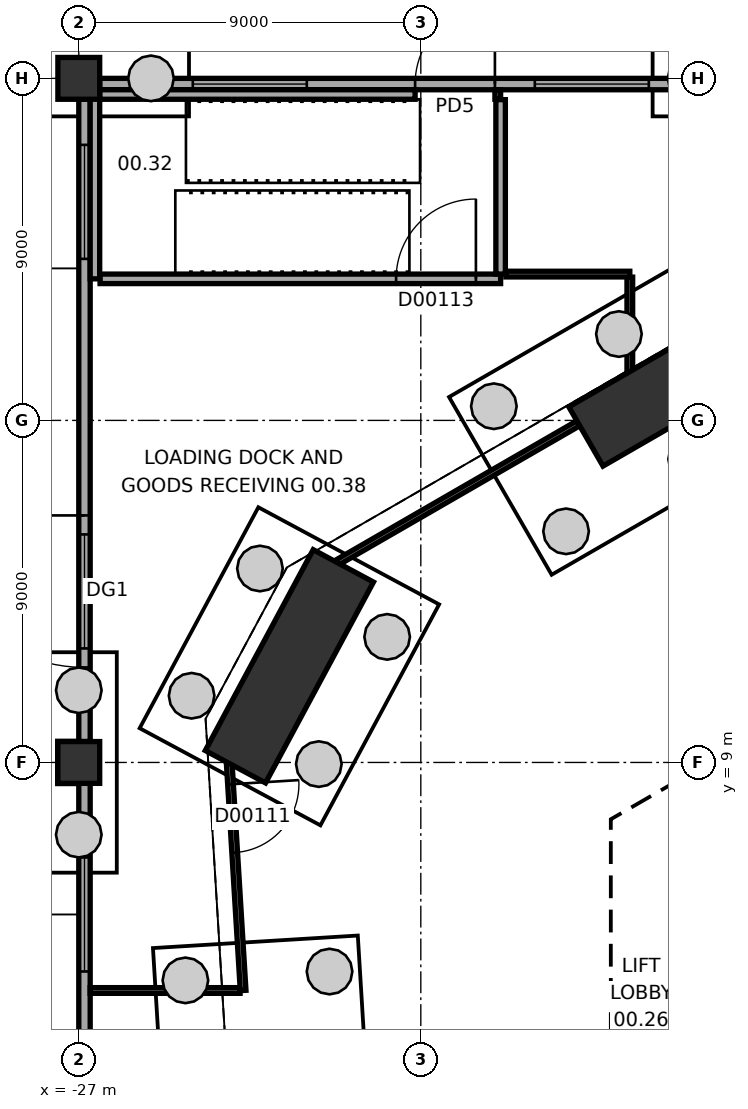
"""IFC4 building model, lengths in metres.
Left out: names, types, materials, properties, quantities, classifications, styles, units other than length and angle.
Written with IfcOpenShell. Run it as: python <this file> out.ifc"""

import sys

from ifc_helpers import new_model, si_unit, direction, frame, frame_2d, origin, origin_2d, place, context, subcontext, project, spatial, rectangle, extrude, element, fill, save


model = new_model("IFC4")
c1 = context("Model", 3, precision=1e-05, world=origin(), true_north=direction((0.0, 1.0)))
c2 = subcontext(c1, "Body", "Model", "MODEL_VIEW")
j1 = project(units=[si_unit("LENGTHUNIT", "METRE"), si_unit("PLANEANGLEUNIT", "RADIAN")], contexts=[c1])
p1 = place(None, origin())
s1 = spatial("IfcSite", under=j1, at=p1, CompositionType="ELEMENT")
p2 = place(p1, origin())
s2 = spatial("IfcBuilding", under=s1, at=p2, CompositionType="ELEMENT")
p3 = place(p2, origin())
s3 = spatial("IfcBuildingStorey", under=s2, at=p3, CompositionType="ELEMENT", Elevation=0.0)
p4 = place(p3, frame((-11.837, 18.627, -0.3), z_axis=(0.0, 0.0, 1.0), x_axis=(-0.866028021766, -0.499995465495, 0.0)))
e1 = element("IfcColumn", 1, at=p4, inside=s3, PredefinedType="COLUMN", context=c2, shape_type="SweptSolid", body=[
    extrude(rectangle(XDim=4.2, YDim=1.8, at=origin_2d()), origin(), (0.0, 0.0, 1.0), 7.8),
])
p5 = place(p3, frame((-21.458, 11.53, -0.3), z_axis=(0.0, 0.0, 1.0), x_axis=(-0.473316592293, -0.880892390397, 0.0)))
e2 = element("IfcColumn", 2, at=p5, inside=s3, PredefinedType="COLUMN", context=c2, shape_type="SweptSolid", body=[
    extrude(rectangle(XDim=6.0, YDim=1.8, at=origin_2d()), origin(), (0.0, 0.0, 1.0), 7.8),
])
for number, where, z_axis, x_axis in (
    (3, (-27.0, 9.0, -0.3), (0.0, 0.0, 1.0), (1.0, 0.0, 0.0)),
    (4, (-27.0, 27.0, -0.3), (0.0, 0.0, 1.0), (1.0, 0.0, 0.0)),
):
    element("IfcColumn", number, at=place(p3, frame(where, z_axis=z_axis, x_axis=x_axis)), inside=s3, PredefinedType="COLUMN", context=c2, shape_type="SweptSolid", body=[
        extrude(rectangle(XDim=1.1, YDim=1.1, at=origin_2d()), origin(), (0.0, 0.0, 1.0), 7.8),
    ])
p6 = place(p3, frame((-9.55, 26.85, 0.0), z_axis=(0.0, 0.0, 1.0), x_axis=(-1.0, 0.0, 0.0)))
e5 = element("IfcWall", 5, at=p6, inside=s3, PredefinedType="STANDARD", context=c2, shape_type="SweptSolid", body=[
    extrude(rectangle(XDim=16.9, YDim=0.3, at=frame_2d((8.45, 0.0))), origin(), (0.0, 0.0, 1.0), 6.0),
])
p7 = place(p6, frame((2.45, 0.0, 4.7)))
e6 = element("IfcOpeningElement", 6, at=p7, cuts=e5, PredefinedType="OPENING", context=c2, shape_type="SweptSolid", body=[
    extrude(rectangle(XDim=3.0, YDim=1.3, at=frame_2d((1.5, 0.65))), frame((0.0, 0.16, 0.0), z_axis=(0.0, -1.0, 0.0), x_axis=(1.0, 0.0, 0.0)), (0.0, 0.0, 1.0), 0.32),
])
p8 = place(p6, frame((11.45, 0.0, 4.7)))
e7 = element("IfcOpeningElement", 7, at=p8, cuts=e5, PredefinedType="OPENING", context=c2, shape_type="SweptSolid", body=[
    extrude(rectangle(XDim=3.0, YDim=1.3, at=frame_2d((1.5, 0.65))), frame((0.0, 0.16, 0.0), z_axis=(0.0, -1.0, 0.0), x_axis=(1.0, 0.0, 0.0)), (0.0, 0.0, 1.0), 0.32),
])
p9 = place(p6, frame((6.5, 0.0, 0.0)))
e8 = element("IfcOpeningElement", 8, at=p9, cuts=e5, PredefinedType="OPENING", context=c2, shape_type="SweptSolid", body=[
    extrude(rectangle(XDim=2.1, YDim=2.4, at=frame_2d((1.05, 1.2))), frame((0.0, 0.16, 0.0), z_axis=(0.0, -1.0, 0.0), x_axis=(1.0, 0.0, 0.0)), (0.0, 0.0, 1.0), 0.32),
])
p10 = place(p3, frame((-26.85, 26.45, 0.0), z_axis=(0.0, 0.0, 1.0), x_axis=(0.0, -1.0, 0.0)))
e9 = element("IfcWall", 9, at=p10, inside=s3, PredefinedType="STANDARD", context=c2, shape_type="SweptSolid", body=[
    extrude(rectangle(XDim=16.9, YDim=0.3, at=frame_2d((8.45, 0.0))), origin(), (0.0, 0.0, 1.0), 6.0),
])
p11 = place(p10, frame((1.2, 0.0, 4.7)))
e10 = element("IfcOpeningElement", 10, at=p11, cuts=e9, PredefinedType="OPENING", context=c2, shape_type="SweptSolid", body=[
    extrude(rectangle(XDim=3.0, YDim=1.3, at=frame_2d((1.5, 0.65))), frame((0.0, 0.16, 0.0), z_axis=(0.0, -1.0, 0.0), x_axis=(1.0, 0.0, 0.0)), (0.0, 0.0, 1.0), 0.32),
])
p12 = place(p10, frame((11.45, 0.0, 4.7)))
e11 = element("IfcOpeningElement", 11, at=p12, cuts=e9, PredefinedType="OPENING", context=c2, shape_type="SweptSolid", body=[
    extrude(rectangle(XDim=3.0, YDim=1.3, at=frame_2d((1.5, 0.65))), frame((0.0, 0.16, 0.0), z_axis=(0.0, -1.0, 0.0), x_axis=(1.0, 0.0, 0.0)), (0.0, 0.0, 1.0), 0.32),
])
p13 = place(p10, frame((10.95, 0.0, 0.0)))
e12 = element("IfcOpeningElement", 12, at=p13, cuts=e9, PredefinedType="OPENING", context=c2, shape_type="SweptSolid", body=[
    extrude(rectangle(XDim=4.0, YDim=4.5, at=frame_2d((2.0, 2.25))), frame((0.0, 0.16, 0.0), z_axis=(0.0, -1.0, 0.0), x_axis=(1.0, 0.0, 0.0)), (0.0, 0.0, 1.0), 0.32),
])
p14 = place(p3, frame((-26.85, 8.45, 0.0), z_axis=(0.0, 0.0, 1.0), x_axis=(0.0, -1.0, 0.0)))
e13 = element("IfcWall", 13, at=p14, inside=s3, PredefinedType="STANDARD", context=c2, shape_type="SweptSolid", body=[
    extrude(rectangle(XDim=16.9, YDim=0.3, at=frame_2d((8.45, 0.0))), origin(), (0.0, 0.0, 1.0), 6.0),
])
p15 = place(p14, frame((1.95, 0.0, 4.7)))
e14 = element("IfcOpeningElement", 14, at=p15, cuts=e13, PredefinedType="OPENING", context=c2, shape_type="SweptSolid", body=[
    extrude(rectangle(XDim=3.0, YDim=1.3, at=frame_2d((1.5, 0.65))), frame((0.0, 0.16, 0.0), z_axis=(0.0, -1.0, 0.0), x_axis=(1.0, 0.0, 0.0)), (0.0, 0.0, 1.0), 0.32),
])
p16 = place(p14, frame((11.95, 0.0, 4.7)))
e15 = element("IfcOpeningElement", 15, at=p16, cuts=e13, PredefinedType="OPENING", context=c2, shape_type="SweptSolid", body=[
    extrude(rectangle(XDim=3.0, YDim=1.3, at=frame_2d((1.5, 0.65))), frame((0.0, 0.16, 0.0), z_axis=(0.0, -1.0, 0.0), x_axis=(1.0, 0.0, 0.0)), (0.0, 0.0, 1.0), 0.32),
])
p17 = place(p14, frame((7.8, 0.0, 0.0)))
e16 = element("IfcOpeningElement", 16, at=p17, cuts=e13, PredefinedType="OPENING", context=c2, shape_type="SweptSolid", body=[
    extrude(rectangle(XDim=1.3, YDim=2.4, at=frame_2d((0.65, 1.2))), frame((0.0, 0.16, 0.0), z_axis=(0.0, -1.0, 0.0), x_axis=(1.0, 0.0, 0.0)), (0.0, 0.0, 1.0), 0.32),
])
p18 = place(p3, frame((-22.756, 3.0, 0.0), z_axis=(0.0, 0.0, 1.0), x_axis=(-1.0, 0.0, 0.0)))
e17 = element("IfcWall", 17, at=p18, inside=s3, PredefinedType="PARTITIONING", context=c2, shape_type="SweptSolid", body=[
    extrude(rectangle(XDim=3.944, YDim=0.15, at=frame_2d((1.972, 0.0))), origin(), (0.0, 0.0, 1.0), 7.2),
])
p19 = place(p3, frame((-23.041, 8.975, 0.0), z_axis=(0.0, 0.0, 1.0), x_axis=(0.061057818877, -0.99813423083, 0.0)))
e18 = element("IfcWall", 18, at=p19, inside=s3, PredefinedType="PARTITIONING", context=c2, shape_type="SweptSolid", body=[
    extrude(rectangle(XDim=5.986, YDim=0.15, at=frame_2d((2.993, 0.0))), origin(), (0.0, 0.0, 1.0), 5.7),
])
p20 = place(p19, frame((0.55, 0.0, 0.0)))
e19 = element("IfcOpeningElement", 19, at=p20, cuts=e18, PredefinedType="OPENING", context=c2, shape_type="SweptSolid", body=[
    extrude(rectangle(XDim=1.8, YDim=2.4, at=frame_2d((0.9, 1.2))), frame((0.0, 0.085, 0.0), z_axis=(0.0, -1.0, 0.0), x_axis=(1.0, 0.0, 0.0)), (0.0, 0.0, 1.0), 0.17),
])
p21 = place(p3, frame((-13.855, 17.924, 0.0), z_axis=(0.0, 0.0, 1.0), x_axis=(-0.866032447223, -0.499987800209, 0.0)))
e20 = element("IfcWall", 20, at=p21, inside=s3, PredefinedType="PARTITIONING", context=c2, shape_type="SweptSolid", body=[
    extrude(rectangle(XDim=7.327, YDim=0.15, at=frame_2d((3.664, 0.0))), origin(), (0.0, 0.0, 1.0), 5.7),
])
p22 = place(p3, frame((-15.9, 21.725, 0.0), z_axis=(0.0, 0.0, 1.0), x_axis=(-1.0, 0.0, 0.0)))
e21 = element("IfcWall", 21, at=p22, inside=s3, PredefinedType="SOLIDWALL", context=c2, shape_type="SweptSolid", body=[
    extrude(rectangle(XDim=10.54, YDim=0.25, at=frame_2d((5.27, 0.0))), origin(), (0.0, 0.0, 1.0), 7.2),
])
p23 = place(p22, frame((0.65, 0.0, 0.0)))
e22 = element("IfcOpeningElement", 22, at=p23, cuts=e21, PredefinedType="OPENING", context=c2, shape_type="SweptSolid", body=[
    extrude(rectangle(XDim=2.1, YDim=2.4, at=frame_2d((1.05, 1.2))), frame((0.0, 0.135, 0.0), z_axis=(0.0, -1.0, 0.0), x_axis=(1.0, 0.0, 0.0)), (0.0, 0.0, 1.0), 0.27),
])
p24 = place(p3, frame((-12.5, 21.77, 0.0), z_axis=(0.0, 0.0, 1.0), x_axis=(0.0, -1.0, 0.0)))
e23 = element("IfcWall", 23, at=p24, inside=s3, PredefinedType="PARTITIONING", context=c2, shape_type="SweptSolid", body=[
    extrude(rectangle(XDim=2.487, YDim=0.15, at=frame_2d((1.243, 0.0))), origin(), (0.0, 0.0, 1.0), 7.2),
])
p25 = place(p3, frame((-15.76, 21.85, 0.0), z_axis=(0.0, 0.0, 1.0), x_axis=(1.0, 0.0, 0.0)))
e24 = element("IfcWall", 24, at=p25, inside=s3, PredefinedType="PARTITIONING", context=c2, shape_type="SweptSolid", body=[
    extrude(rectangle(XDim=3.26, YDim=0.15, at=frame_2d((1.63, 0.0))), origin(), (0.0, 0.0, 1.0), 7.2),
])
p26 = place(p3, frame((-15.9, 26.44, 0.0), z_axis=(0.0, 0.0, 1.0), x_axis=(0.0, -1.0, 0.0)))
e25 = element("IfcWall", 25, at=p26, inside=s3, PredefinedType="SOLIDWALL", context=c2, shape_type="SweptSolid", body=[
    extrude(rectangle(XDim=4.59, YDim=0.25, at=frame_2d((2.295, 0.0))), origin(), (0.0, 0.0, 1.0), 7.2),
])
p27 = place(p3, frame((-26.575, 21.725, 0.0), z_axis=(0.0, 0.0, 1.0), x_axis=(0.0, 1.0, 0.0)))
e26 = element("IfcWall", 26, at=p27, inside=s3, PredefinedType="SOLIDWALL", context=c2, shape_type="SweptSolid", body=[
    extrude(rectangle(XDim=4.975, YDim=0.25, at=frame_2d((2.487, 0.0))), origin(), (0.0, 0.0, 1.0), 7.2),
])
p28 = place(p3, frame((-26.45, 26.575, 0.0), z_axis=(0.0, 0.0, 1.0), x_axis=(1.0, 0.0, 0.0)))
e27 = element("IfcWall", 27, at=p28, inside=s3, PredefinedType="SOLIDWALL", context=c2, shape_type="SweptSolid", body=[
    extrude(rectangle(XDim=8.3, YDim=0.25, at=frame_2d((4.15, 0.0))), origin(), (0.0, 0.0, 1.0), 7.2),
])
p29 = place(p3, frame((-16.05, 26.575, 0.0), z_axis=(0.0, 0.0, 1.0), x_axis=(1.0, 0.0, 0.0)))
e28 = element("IfcWall", 28, at=p29, inside=s3, PredefinedType="SOLIDWALL", context=c2, shape_type="SweptSolid", body=[
    extrude(rectangle(XDim=0.15, YDim=0.25, at=frame_2d((0.075, 0.0))), origin(), (0.0, 0.0, 1.0), 7.2),
])
p30 = place(p7, origin())
e29 = element("IfcWindow", 29, at=p30, inside=s3, PartitioningType="SINGLE_PANEL", PredefinedType="WINDOW", context=c2, shape_type="SweptSolid", body=[
    extrude(rectangle(XDim=3.0, YDim=1.3, at=frame_2d((1.5, 0.65))), frame((0.0, 0.03, 0.0), z_axis=(0.0, -1.0, 0.0), x_axis=(1.0, 0.0, 0.0)), (0.0, 0.0, 1.0), 0.06),
])
fill(e6, e29)
p31 = place(p8, origin())
e30 = element("IfcWindow", 30, at=p31, inside=s3, PartitioningType="SINGLE_PANEL", PredefinedType="WINDOW", context=c2, shape_type="SweptSolid", body=[
    extrude(rectangle(XDim=3.0, YDim=1.3, at=frame_2d((1.5, 0.65))), frame((0.0, 0.03, 0.0), z_axis=(0.0, -1.0, 0.0), x_axis=(1.0, 0.0, 0.0)), (0.0, 0.0, 1.0), 0.06),
])
fill(e7, e30)
p32 = place(p11, origin())
e31 = element("IfcWindow", 31, at=p32, inside=s3, PartitioningType="SINGLE_PANEL", PredefinedType="WINDOW", context=c2, shape_type="SweptSolid", body=[
    extrude(rectangle(XDim=3.0, YDim=1.3, at=frame_2d((1.5, 0.65))), frame((0.0, 0.03, 0.0), z_axis=(0.0, -1.0, 0.0), x_axis=(1.0, 0.0, 0.0)), (0.0, 0.0, 1.0), 0.06),
])
fill(e10, e31)
p33 = place(p12, origin())
e32 = element("IfcWindow", 32, at=p33, inside=s3, PartitioningType="SINGLE_PANEL", PredefinedType="WINDOW", context=c2, shape_type="SweptSolid", body=[
    extrude(rectangle(XDim=3.0, YDim=1.3, at=frame_2d((1.5, 0.65))), frame((0.0, 0.03, 0.0), z_axis=(0.0, -1.0, 0.0), x_axis=(1.0, 0.0, 0.0)), (0.0, 0.0, 1.0), 0.06),
])
fill(e11, e32)
p34 = place(p15, origin())
e33 = element("IfcWindow", 33, at=p34, inside=s3, PartitioningType="SINGLE_PANEL", PredefinedType="WINDOW", context=c2, shape_type="SweptSolid", body=[
    extrude(rectangle(XDim=3.0, YDim=1.3, at=frame_2d((1.5, 0.65))), frame((0.0, 0.03, 0.0), z_axis=(0.0, -1.0, 0.0), x_axis=(1.0, 0.0, 0.0)), (0.0, 0.0, 1.0), 0.06),
])
fill(e14, e33)
p35 = place(p20, origin())
e34 = element("IfcDoor", 34, at=p35, inside=s3, OperationType="DOUBLE_DOOR_SINGLE_SWING", PredefinedType="DOOR", context=c2, shape_type="SweptSolid", body=[
    extrude(rectangle(XDim=1.8, YDim=2.4, at=frame_2d((0.9, 1.2))), frame((0.0, 0.025, 0.0), z_axis=(0.0, -1.0, 0.0), x_axis=(1.0, 0.0, 0.0)), (0.0, 0.0, 1.0), 0.05),
])
fill(e19, e34)
p36 = place(p23, frame((2.1, 0.0, 0.0), z_axis=(0.0, 0.0, 1.0), x_axis=(-1.0, 0.0, 0.0)))
e35 = element("IfcDoor", 35, at=p36, inside=s3, OperationType="DOUBLE_DOOR_SINGLE_SWING", PredefinedType="DOOR", context=c2, shape_type="SweptSolid", body=[
    extrude(rectangle(XDim=2.1, YDim=2.4, at=frame_2d((1.05, 1.2))), frame((0.0, 0.025, 0.0), z_axis=(0.0, -1.0, 0.0), x_axis=(1.0, 0.0, 0.0)), (0.0, 0.0, 1.0), 0.05),
])
fill(e22, e35)
p37 = place(p13, frame((4.0, 0.0, 0.0), z_axis=(0.0, 0.0, 1.0), x_axis=(-1.0, 0.0, 0.0)))
e36 = element("IfcDoor", 36, at=p37, inside=s3, OperationType="ROLLINGUP", PredefinedType="DOOR", context=c2, shape_type="SweptSolid", body=[
    extrude(rectangle(XDim=4.0, YDim=4.5, at=frame_2d((2.0, 2.25))), frame((0.0, 0.025, 0.0), z_axis=(0.0, -1.0, 0.0), x_axis=(1.0, 0.0, 0.0)), (0.0, 0.0, 1.0), 0.05),
])
fill(e12, e36)
p38 = place(p9, frame((2.1, 0.0, 0.0), z_axis=(0.0, 0.0, 1.0), x_axis=(-1.0, 0.0, 0.0)))
e37 = element("IfcDoor", 37, at=p38, inside=s3, OperationType="DOUBLE_DOOR_SINGLE_SWING", PredefinedType="DOOR", context=c2, shape_type="SweptSolid", body=[
    extrude(rectangle(XDim=2.1, YDim=2.4, at=frame_2d((1.05, 1.2))), frame((0.0, 0.025, 0.0), z_axis=(0.0, -1.0, 0.0), x_axis=(1.0, 0.0, 0.0)), (0.0, 0.0, 1.0), 0.05),
])
fill(e8, e37)
save(model, sys.argv[1])
